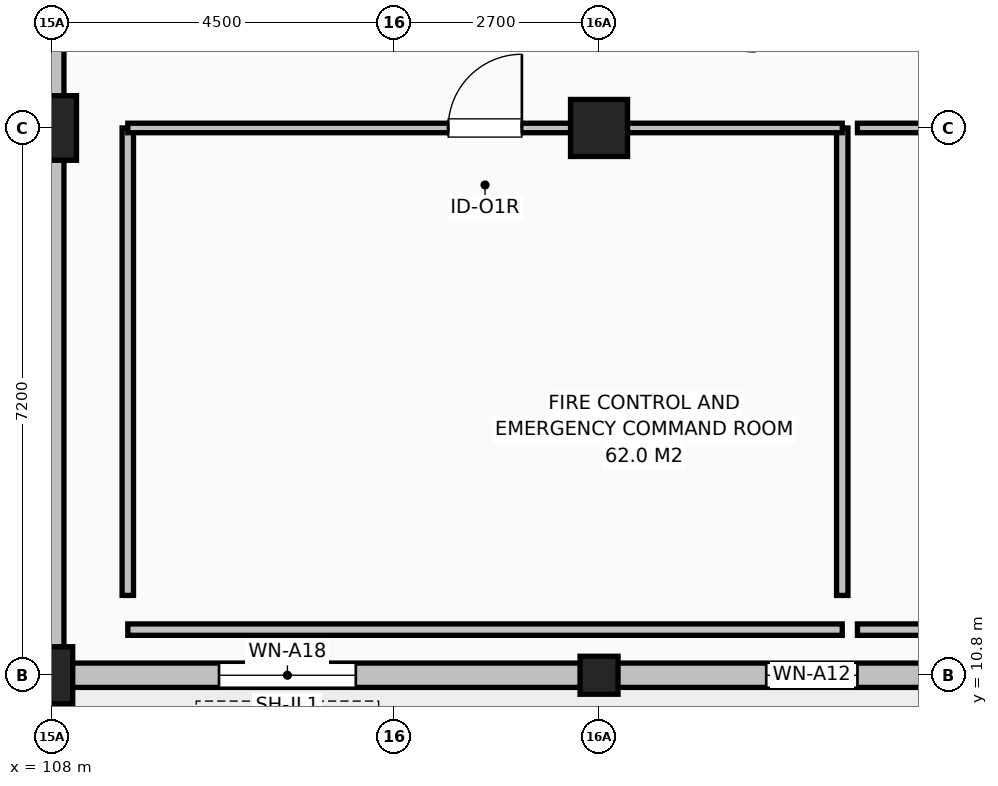
"""IFC4 building model, lengths in metres.
Left out: names, types, materials, properties, quantities, classifications, styles, units other than length and angle.
Written with IfcOpenShell. Run it as: python <this file> out.ifc"""

import sys

from ifc_helpers import new_model, si_unit, direction, frame, frame_2d, origin, origin_2d, place, context, subcontext, project, spatial, rectangle, circle, extrude, element, fill, save


model = new_model("IFC4")
c1 = context("Model", 3, precision=1e-05, world=origin(), true_north=direction((0.0, 1.0)))
c2 = subcontext(c1, "Body", "Model", "MODEL_VIEW")
j1 = project(units=[si_unit("LENGTHUNIT", "METRE"), si_unit("PLANEANGLEUNIT", "RADIAN")], contexts=[c1])
p1 = place(None, origin())
s1 = spatial("IfcSite", under=j1, at=p1, CompositionType="ELEMENT")
p2 = place(p1, origin())
s2 = spatial("IfcBuilding", under=s1, at=p2, CompositionType="ELEMENT")
p3 = place(p2, origin())
s3 = spatial("IfcBuildingStorey", under=s2, at=p3, CompositionType="ELEMENT", Elevation=0.0)
p4 = place(p3, frame((108.0, 10.8, 0.0), z_axis=(0.0, 0.0, 1.0), x_axis=(1.0, 0.0, 0.0)))
e1 = element("IfcColumn", 1, at=p4, inside=s3, PredefinedType="COLUMN", context=c2, shape_type="SweptSolid", body=[
    extrude(rectangle(XDim=0.55, YDim=0.75, at=origin_2d()), origin(), (0.0, 0.0, 1.0), 4.8),
])
p5 = place(p3, frame((108.0, 18.0, 0.0), z_axis=(0.0, 0.0, 1.0), x_axis=(1.0, 0.0, 0.0)))
e2 = element("IfcColumn", 2, at=p5, inside=s3, PredefinedType="COLUMN", context=c2, shape_type="SweptSolid", body=[
    extrude(rectangle(XDim=0.65, YDim=0.85, at=origin_2d()), origin(), (0.0, 0.0, 1.0), 4.8),
])
p6 = place(p3, frame((115.2, 10.8, 0.0), z_axis=(0.0, 0.0, 1.0), x_axis=(1.0, 0.0, 0.0)))
e3 = element("IfcColumn", 3, at=p6, inside=s3, PredefinedType="COLUMN", context=c2, shape_type="SweptSolid", body=[
    extrude(circle(Radius=0.25, at=origin_2d()), origin(), (0.0, 0.0, 1.0), 4.8),
])
p7 = place(p3, frame((115.2, 18.0, 0.0), z_axis=(0.0, 0.0, 1.0), x_axis=(1.0, 0.0, 0.0)))
e4 = element("IfcColumn", 4, at=p7, inside=s3, PredefinedType="COLUMN", context=c2, shape_type="SweptSolid", body=[
    extrude(circle(Radius=0.375, at=origin_2d()), origin(), (0.0, 0.0, 1.0), 4.8),
])
p8 = place(p3, frame((108.0, 10.8, 0.0), z_axis=(0.0, 0.0, 1.0), x_axis=(1.0, 0.0, 0.0)))
e5 = element("IfcWall", 5, at=p8, inside=s3, PredefinedType="SOLIDWALL", context=c2, shape_type="SweptSolid", body=[
    extrude(rectangle(XDim=79.2, YDim=0.32, at=frame_2d((39.6, 0.0))), origin(), (0.0, 0.0, 1.0), 4.25),
])
p9 = place(p8, frame((2.2, 0.0, 0.72)))
e6 = element("IfcOpeningElement", 6, at=p9, cuts=e5, PredefinedType="OPENING", context=c2, shape_type="SweptSolid", body=[
    extrude(rectangle(XDim=1.8, YDim=2.15, at=frame_2d((0.9, 1.075))), frame((0.0, 0.17, 0.0), z_axis=(0.0, -1.0, 0.0), x_axis=(1.0, 0.0, 0.0)), (0.0, 0.0, 1.0), 0.34),
])
p10 = place(p8, frame((9.4, 0.0, 0.72)))
e7 = element("IfcOpeningElement", 7, at=p10, cuts=e5, PredefinedType="OPENING", context=c2, shape_type="SweptSolid", body=[
    extrude(rectangle(XDim=1.2, YDim=2.0, at=frame_2d((0.6, 1.0))), frame((0.0, 0.17, 0.0), z_axis=(0.0, -1.0, 0.0), x_axis=(1.0, 0.0, 0.0)), (0.0, 0.0, 1.0), 0.34),
])
p11 = place(p8, frame((16.6, 0.0, 0.72)))
e8 = element("IfcOpeningElement", 8, at=p11, cuts=e5, PredefinedType="OPENING", context=c2, shape_type="SweptSolid", body=[
    extrude(rectangle(XDim=1.35, YDim=2.05, at=frame_2d((0.675, 1.025))), frame((0.0, 0.17, 0.0), z_axis=(0.0, -1.0, 0.0), x_axis=(1.0, 0.0, 0.0)), (0.0, 0.0, 1.0), 0.34),
])
p12 = place(p8, frame((23.8, 0.0, 0.72)))
e9 = element("IfcOpeningElement", 9, at=p12, cuts=e5, PredefinedType="OPENING", context=c2, shape_type="SweptSolid", body=[
    extrude(rectangle(XDim=1.5, YDim=2.1, at=frame_2d((0.75, 1.05))), frame((0.0, 0.17, 0.0), z_axis=(0.0, -1.0, 0.0), x_axis=(1.0, 0.0, 0.0)), (0.0, 0.0, 1.0), 0.34),
])
p13 = place(p8, frame((31.0, 0.0, 0.72)))
e10 = element("IfcOpeningElement", 10, at=p13, cuts=e5, PredefinedType="OPENING", context=c2, shape_type="SweptSolid", body=[
    extrude(rectangle(XDim=1.65, YDim=2.1, at=frame_2d((0.825, 1.05))), frame((0.0, 0.17, 0.0), z_axis=(0.0, -1.0, 0.0), x_axis=(1.0, 0.0, 0.0)), (0.0, 0.0, 1.0), 0.34),
])
p14 = place(p8, frame((38.2, 0.0, 0.72)))
e11 = element("IfcOpeningElement", 11, at=p14, cuts=e5, PredefinedType="OPENING", context=c2, shape_type="SweptSolid", body=[
    extrude(rectangle(XDim=1.8, YDim=2.15, at=frame_2d((0.9, 1.075))), frame((0.0, 0.17, 0.0), z_axis=(0.0, -1.0, 0.0), x_axis=(1.0, 0.0, 0.0)), (0.0, 0.0, 1.0), 0.34),
])
p15 = place(p8, frame((45.4, 0.0, 0.72)))
e12 = element("IfcOpeningElement", 12, at=p15, cuts=e5, PredefinedType="OPENING", context=c2, shape_type="SweptSolid", body=[
    extrude(rectangle(XDim=1.2, YDim=2.0, at=frame_2d((0.6, 1.0))), frame((0.0, 0.17, 0.0), z_axis=(0.0, -1.0, 0.0), x_axis=(1.0, 0.0, 0.0)), (0.0, 0.0, 1.0), 0.34),
])
p16 = place(p8, frame((52.6, 0.0, 0.72)))
e13 = element("IfcOpeningElement", 13, at=p16, cuts=e5, PredefinedType="OPENING", context=c2, shape_type="SweptSolid", body=[
    extrude(rectangle(XDim=1.35, YDim=2.05, at=frame_2d((0.675, 1.025))), frame((0.0, 0.17, 0.0), z_axis=(0.0, -1.0, 0.0), x_axis=(1.0, 0.0, 0.0)), (0.0, 0.0, 1.0), 0.34),
])
p17 = place(p8, frame((59.8, 0.0, 0.72)))
e14 = element("IfcOpeningElement", 14, at=p17, cuts=e5, PredefinedType="OPENING", context=c2, shape_type="SweptSolid", body=[
    extrude(rectangle(XDim=1.5, YDim=2.1, at=frame_2d((0.75, 1.05))), frame((0.0, 0.17, 0.0), z_axis=(0.0, -1.0, 0.0), x_axis=(1.0, 0.0, 0.0)), (0.0, 0.0, 1.0), 0.34),
])
p18 = place(p8, frame((67.0, 0.0, 0.72)))
e15 = element("IfcOpeningElement", 15, at=p18, cuts=e5, PredefinedType="OPENING", context=c2, shape_type="SweptSolid", body=[
    extrude(rectangle(XDim=1.65, YDim=2.1, at=frame_2d((0.825, 1.05))), frame((0.0, 0.17, 0.0), z_axis=(0.0, -1.0, 0.0), x_axis=(1.0, 0.0, 0.0)), (0.0, 0.0, 1.0), 0.34),
])
p19 = place(p3, frame((108.0, 54.0, 0.0), z_axis=(0.0, 0.0, 1.0), x_axis=(0.0, -1.0, 0.0)))
e16 = element("IfcWall", 16, at=p19, inside=s3, PredefinedType="SOLIDWALL", context=c2, shape_type="SweptSolid", body=[
    extrude(rectangle(XDim=43.2, YDim=0.32, at=frame_2d((21.6, 0.0))), origin(), (0.0, 0.0, 1.0), 4.25),
])
p20 = place(p19, frame((2.2, 0.0, 0.72)))
e17 = element("IfcOpeningElement", 17, at=p20, cuts=e16, PredefinedType="OPENING", context=c2, shape_type="SweptSolid", body=[
    extrude(rectangle(XDim=1.2, YDim=2.0, at=frame_2d((0.6, 1.0))), frame((0.0, 0.17, 0.0), z_axis=(0.0, -1.0, 0.0), x_axis=(1.0, 0.0, 0.0)), (0.0, 0.0, 1.0), 0.34),
])
p21 = place(p19, frame((16.6, 0.0, 0.72)))
e18 = element("IfcOpeningElement", 18, at=p21, cuts=e16, PredefinedType="OPENING", context=c2, shape_type="SweptSolid", body=[
    extrude(rectangle(XDim=1.5, YDim=2.1, at=frame_2d((0.75, 1.05))), frame((0.0, 0.17, 0.0), z_axis=(0.0, -1.0, 0.0), x_axis=(1.0, 0.0, 0.0)), (0.0, 0.0, 1.0), 0.34),
])
p22 = place(p19, frame((23.8, 0.0, 0.72)))
e19 = element("IfcOpeningElement", 19, at=p22, cuts=e16, PredefinedType="OPENING", context=c2, shape_type="SweptSolid", body=[
    extrude(rectangle(XDim=1.65, YDim=2.1, at=frame_2d((0.825, 1.05))), frame((0.0, 0.17, 0.0), z_axis=(0.0, -1.0, 0.0), x_axis=(1.0, 0.0, 0.0)), (0.0, 0.0, 1.0), 0.34),
])
p23 = place(p19, frame((31.0, 0.0, 0.72)))
e20 = element("IfcOpeningElement", 20, at=p23, cuts=e16, PredefinedType="OPENING", context=c2, shape_type="SweptSolid", body=[
    extrude(rectangle(XDim=1.8, YDim=2.15, at=frame_2d((0.9, 1.075))), frame((0.0, 0.17, 0.0), z_axis=(0.0, -1.0, 0.0), x_axis=(1.0, 0.0, 0.0)), (0.0, 0.0, 1.0), 0.34),
])
p24 = place(p19, frame((6.2, 0.0, 0.0)))
e21 = element("IfcOpeningElement", 21, at=p24, cuts=e16, PredefinedType="OPENING", context=c2, shape_type="SweptSolid", body=[
    extrude(rectangle(XDim=2.0, YDim=2.35, at=frame_2d((1.0, 1.175))), frame((0.0, 0.17, 0.0), z_axis=(0.0, -1.0, 0.0), x_axis=(1.0, 0.0, 0.0)), (0.0, 0.0, 1.0), 0.34),
])
p25 = place(p3, frame((118.4, 11.4, 0.0), z_axis=(0.0, 0.0, 1.0), x_axis=(-1.0, 0.0, 0.0)))
e22 = element("IfcWall", 22, at=p25, inside=s3, PredefinedType="PARTITIONING", context=c2, shape_type="SweptSolid", body=[
    extrude(rectangle(XDim=9.4, YDim=0.15, at=frame_2d((4.7, 0.0))), origin(), (0.0, 0.0, 1.0), 3.857),
])
p26 = place(p3, frame((118.4, 11.85, 0.0), z_axis=(0.0, 0.0, 1.0), x_axis=(0.0, 1.0, 0.0)))
e23 = element("IfcWall", 23, at=p26, inside=s3, PredefinedType="PARTITIONING", context=c2, shape_type="SweptSolid", body=[
    extrude(rectangle(XDim=6.15, YDim=0.15, at=frame_2d((3.075, 0.0))), origin(), (0.0, 0.0, 1.0), 3.857),
])
p27 = place(p3, frame((109.0, 18.0, 0.0), z_axis=(0.0, 0.0, 1.0), x_axis=(0.0, -1.0, 0.0)))
e24 = element("IfcWall", 24, at=p27, inside=s3, PredefinedType="PARTITIONING", context=c2, shape_type="SweptSolid", body=[
    extrude(rectangle(XDim=6.15, YDim=0.15, at=frame_2d((3.075, 0.0))), origin(), (0.0, 0.0, 1.0), 3.957),
])
p28 = place(p3, frame((109.0, 18.0, 0.0), z_axis=(0.0, 0.0, 1.0), x_axis=(1.0, 0.0, 0.0)))
e25 = element("IfcWall", 25, at=p28, inside=s3, PredefinedType="PARTITIONING", context=c2, shape_type="SweptSolid", body=[
    extrude(rectangle(XDim=9.4, YDim=0.125, at=frame_2d((4.7, 0.0))), origin(), (0.0, 0.0, 1.0), 3.857),
])
p29 = place(p28, frame((4.215, 0.0, 0.0)))
e26 = element("IfcOpeningElement", 26, at=p29, cuts=e25, PredefinedType="OPENING", context=c2, shape_type="SweptSolid", body=[
    extrude(rectangle(XDim=0.97, YDim=2.15, at=frame_2d((0.485, 1.075))), frame((0.0, 0.073, 0.0), z_axis=(0.0, -1.0, 0.0), x_axis=(1.0, 0.0, 0.0)), (0.0, 0.0, 1.0), 0.145),
])
p30 = place(p3, frame((134.8, 11.4, 0.0), z_axis=(0.0, 0.0, 1.0), x_axis=(-1.0, 0.0, 0.0)))
e27 = element("IfcWall", 27, at=p30, inside=s3, PredefinedType="PARTITIONING", context=c2, shape_type="SweptSolid", body=[
    extrude(rectangle(XDim=16.2, YDim=0.15, at=frame_2d((8.1, 0.0))), origin(), (0.0, 0.0, 1.0), 3.557),
])
p31 = place(p3, frame((118.6, 18.0, 0.0), z_axis=(0.0, 0.0, 1.0), x_axis=(1.0, 0.0, 0.0)))
e28 = element("IfcWall", 28, at=p31, inside=s3, PredefinedType="PARTITIONING", context=c2, shape_type="SweptSolid", body=[
    extrude(rectangle(XDim=16.2, YDim=0.125, at=frame_2d((8.1, 0.0))), origin(), (0.0, 0.0, 1.0), 3.757),
])
p32 = place(p31, frame((7.62, 0.0, 0.0)))
e29 = element("IfcOpeningElement", 29, at=p32, cuts=e28, PredefinedType="OPENING", context=c2, shape_type="SweptSolid", body=[
    extrude(rectangle(XDim=0.96, YDim=2.15, at=frame_2d((0.48, 1.075))), frame((0.0, 0.073, 0.0), z_axis=(0.0, -1.0, 0.0), x_axis=(1.0, 0.0, 0.0)), (0.0, 0.0, 1.0), 0.145),
])
p33 = place(p9, origin())
e30 = element("IfcWindow", 30, at=p33, inside=s3, PartitioningType="SINGLE_PANEL", PredefinedType="WINDOW", context=c2, shape_type="SweptSolid", body=[
    extrude(rectangle(XDim=1.8, YDim=2.15, at=frame_2d((0.9, 1.075))), frame((0.0, 0.03, 0.0), z_axis=(0.0, -1.0, 0.0), x_axis=(1.0, 0.0, 0.0)), (0.0, 0.0, 1.0), 0.06),
])
fill(e6, e30)
p34 = place(p10, origin())
e31 = element("IfcWindow", 31, at=p34, inside=s3, PartitioningType="SINGLE_PANEL", PredefinedType="WINDOW", context=c2, shape_type="SweptSolid", body=[
    extrude(rectangle(XDim=1.2, YDim=2.0, at=frame_2d((0.6, 1.0))), frame((0.0, 0.03, 0.0), z_axis=(0.0, -1.0, 0.0), x_axis=(1.0, 0.0, 0.0)), (0.0, 0.0, 1.0), 0.06),
])
fill(e7, e31)
p35 = place(p29, origin())
e32 = element("IfcDoor", 32, at=p35, inside=s3, OperationType="SINGLE_SWING_RIGHT", PredefinedType="DOOR", context=c2, shape_type="SweptSolid", body=[
    extrude(rectangle(XDim=0.97, YDim=2.15, at=frame_2d((0.485, 1.075))), frame((0.0, 0.025, 0.0), z_axis=(0.0, -1.0, 0.0), x_axis=(1.0, 0.0, 0.0)), (0.0, 0.0, 1.0), 0.05),
])
fill(e26, e32)
save(model, sys.argv[1])
